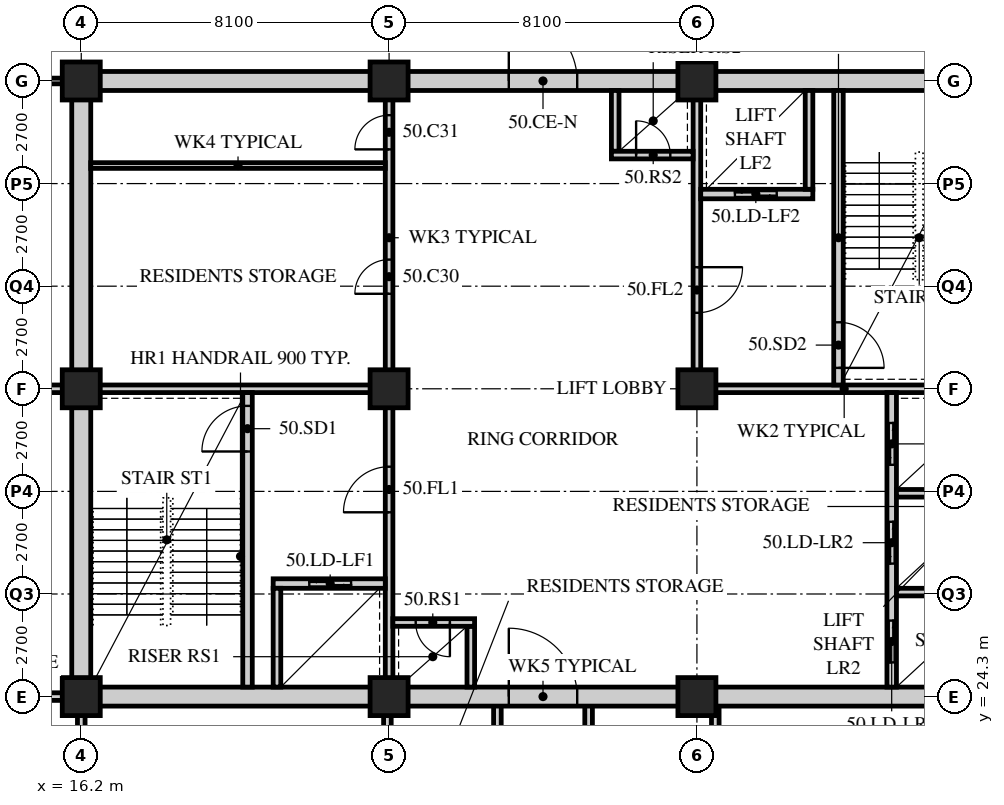
"""IFC4 building model, lengths in metres.
Left out: names, types, materials, properties, quantities, classifications, styles, units other than length and angle.
Written with IfcOpenShell. Run it as: python <this file> out.ifc"""

import sys

from ifc_helpers import new_model, si_unit, direction, frame, frame_2d, origin, origin_2d, place, context, subcontext, project, spatial, rectangle, hollow_rectangle, extrude, element, fill, save


model = new_model("IFC4")
c1 = context("Model", 3, precision=1e-05, world=origin(), true_north=direction((0.0, 1.0)))
c2 = subcontext(c1, "Body", "Model", "MODEL_VIEW")
j1 = project(units=[si_unit("LENGTHUNIT", "METRE"), si_unit("PLANEANGLEUNIT", "RADIAN")], contexts=[c1])
p1 = place(None, origin())
s1 = spatial("IfcSite", under=j1, at=p1, CompositionType="ELEMENT")
p2 = place(p1, origin())
s2 = spatial("IfcBuilding", under=s1, at=p2, CompositionType="ELEMENT")
p3 = place(p2, frame((0.0, 0.0, 195.6)))
s3 = spatial("IfcBuildingStorey", under=s2, at=p3, CompositionType="ELEMENT", Elevation=195.6)
for number, where, z_axis, x_axis in (
    (1, (16.2, 24.3, 0.0), (0.0, 0.0, 1.0), (1.0, 0.0, 0.0)),
    (2, (16.2, 32.4, 0.0), (0.0, 0.0, 1.0), (1.0, 0.0, 0.0)),
    (3, (16.2, 40.5, 0.0), (0.0, 0.0, 1.0), (1.0, 0.0, 0.0)),
    (4, (24.3, 24.3, 0.0), (0.0, 0.0, 1.0), (1.0, 0.0, 0.0)),
    (5, (24.3, 32.4, 0.0), (0.0, 0.0, 1.0), (1.0, 0.0, 0.0)),
    (6, (24.3, 40.5, 0.0), (0.0, 0.0, 1.0), (1.0, 0.0, 0.0)),
    (7, (32.4, 24.3, 0.0), (0.0, 0.0, 1.0), (1.0, 0.0, 0.0)),
    (8, (32.4, 32.4, 0.0), (0.0, 0.0, 1.0), (1.0, 0.0, 0.0)),
    (9, (32.4, 40.5, 0.0), (0.0, 0.0, 1.0), (1.0, 0.0, 0.0)),
):
    element("IfcColumn", number, at=place(p3, frame(where, z_axis=z_axis, x_axis=x_axis)), inside=s3, PredefinedType="COLUMN", context=c2, shape_type="SweptSolid", body=[
        extrude(hollow_rectangle(XDim=1.0, YDim=1.0, WallThickness=0.1, at=origin_2d()), origin(), (0.0, 0.0, 1.0), 3.6),
    ])
p4 = place(p3, frame((16.0, 40.5, 0.0), z_axis=(0.0, 0.0, 1.0), x_axis=(-1.0, 0.0, 0.0)))
e10 = element("IfcWall", 10, at=p4, inside=s3, PredefinedType="PARTITIONING", context=c2, shape_type="SweptSolid", body=[
    extrude(rectangle(XDim=6.1, YDim=0.15, at=frame_2d((3.05, 0.0))), origin(), (0.0, 0.0, 1.0), 3.39),
])
p5 = place(p3, frame((9.9, 32.4, 0.0), z_axis=(0.0, 0.0, 1.0), x_axis=(1.0, 0.0, 0.0)))
e11 = element("IfcWall", 11, at=p5, inside=s3, PredefinedType="SOLIDWALL", context=c2, shape_type="SweptSolid", body=[
    extrude(rectangle(XDim=6.3, YDim=0.2, at=frame_2d((3.15, 0.0))), origin(), (0.0, 0.0, 1.0), 3.39),
])
for number, where, z_axis, x_axis in (
    (12, (16.2, 20.7, 0.0), (0.0, 0.0, 1.0), (0.0, 1.0, 0.0)),
    (13, (24.256, 20.7, 0.0), (0.0, 0.0, 1.0), (0.0, 1.0, 0.0)),
):
    element("IfcWall", number, at=place(p3, frame(where, z_axis=z_axis, x_axis=x_axis)), inside=s3, PredefinedType="SOLIDWALL", context=c2, shape_type="SweptSolid", body=[
        extrude(rectangle(XDim=3.6, YDim=0.2, at=frame_2d((1.8, 0.0))), origin(), (0.0, 0.0, 1.0), 2.778),
    ])
for number, where, z_axis, x_axis in (
    (14, (32.883, 20.7, 0.0), (0.0, 0.0, 1.0), (0.0, 1.0, 0.0)),
    (15, (27.15, 20.7, 0.0), (0.0, 0.0, 1.0), (0.0, 1.0, 0.0)),
    (16, (29.55, 20.7, 0.0), (0.0, 0.0, 1.0), (0.0, 1.0, 0.0)),
):
    element("IfcWall", number, at=place(p3, frame(where, z_axis=z_axis, x_axis=x_axis)), inside=s3, PredefinedType="SOLIDWALL", context=c2, shape_type="SweptSolid", body=[
        extrude(rectangle(XDim=3.6, YDim=0.2, at=frame_2d((1.8, 0.0))), origin(), (0.0, 0.0, 1.0), 3.39),
    ])
p6 = place(p3, frame((9.9, 24.3, 0.0), z_axis=(0.0, 0.0, 1.0), x_axis=(1.0, 0.0, 0.0)))
e17 = element("IfcWall", 17, at=p6, inside=s3, PredefinedType="SOLIDWALL", context=c2, shape_type="SweptSolid", body=[
    extrude(rectangle(XDim=6.3, YDim=0.2, at=frame_2d((3.15, 0.0))), origin(), (0.0, 0.0, 1.0), 3.39),
])
p7 = place(p3, frame((15.95, 24.3, 0.0), z_axis=(0.0, 0.0, 1.0), x_axis=(1.0, 0.0, 0.0)))
e18 = element("IfcWall", 18, at=p7, inside=s3, PredefinedType="SOLIDWALL", context=c2, shape_type="SweptSolid", body=[
    extrude(rectangle(XDim=24.8, YDim=0.5, at=frame_2d((12.4, 0.0))), origin(), (0.0, 0.0, 1.0), 2.74),
])
p8 = place(p7, frame((11.5, 0.0, 0.0)))
e19 = element("IfcOpeningElement", 19, at=p8, cuts=e18, PredefinedType="OPENING", context=c2, shape_type="SweptSolid", body=[
    extrude(rectangle(XDim=1.8, YDim=2.4, at=frame_2d((0.9, 1.2))), frame((0.0, 0.26, 0.0), z_axis=(0.0, -1.0, 0.0), x_axis=(1.0, 0.0, 0.0)), (0.0, 0.0, 1.0), 0.52),
])
p9 = place(p3, frame((15.95, 40.5, 0.0), z_axis=(0.0, 0.0, 1.0), x_axis=(1.0, 0.0, 0.0)))
e20 = element("IfcWall", 20, at=p9, inside=s3, PredefinedType="SOLIDWALL", context=c2, shape_type="SweptSolid", body=[
    extrude(rectangle(XDim=24.8, YDim=0.5, at=frame_2d((12.4, 0.0))), origin(), (0.0, 0.0, 1.0), 2.74),
])
p10 = place(p9, frame((11.5, 0.0, 0.0)))
e21 = element("IfcOpeningElement", 21, at=p10, cuts=e20, PredefinedType="OPENING", context=c2, shape_type="SweptSolid", body=[
    extrude(rectangle(XDim=1.8, YDim=2.4, at=frame_2d((0.9, 1.2))), frame((0.0, 0.26, 0.0), z_axis=(0.0, -1.0, 0.0), x_axis=(1.0, 0.0, 0.0)), (0.0, 0.0, 1.0), 0.52),
])
p11 = place(p3, frame((16.2, 24.55, 0.0), z_axis=(0.0, 0.0, 1.0), x_axis=(0.0, 1.0, 0.0)))
e22 = element("IfcWall", 22, at=p11, inside=s3, PredefinedType="SOLIDWALL", context=c2, shape_type="SweptSolid", body=[
    extrude(rectangle(XDim=15.7, YDim=0.5, at=frame_2d((7.85, 0.0))), origin(), (0.0, 0.0, 1.0), 2.778),
])
p12 = place(p3, frame((16.45, 32.4, 0.0), z_axis=(0.0, 0.0, 1.0), x_axis=(1.0, 0.0, 0.0)))
e23 = element("IfcWall", 23, at=p12, inside=s3, PredefinedType="SOLIDWALL", context=c2, shape_type="SweptSolid", body=[
    extrude(rectangle(XDim=7.95, YDim=0.2, at=frame_2d((3.975, 0.0))), origin(), (0.0, 0.0, 1.0), 2.778),
])
p13 = place(p3, frame((24.3, 24.55, 0.0), z_axis=(0.0, 0.0, 1.0), x_axis=(0.0, 1.0, 0.0)))
e24 = element("IfcWall", 24, at=p13, inside=s3, PredefinedType="SOLIDWALL", context=c2, shape_type="SweptSolid", body=[
    extrude(rectangle(XDim=7.75, YDim=0.2, at=frame_2d((3.875, 0.0))), origin(), (0.0, 0.0, 1.0), 2.778),
])
p14 = place(p13, frame((4.6, 0.0, 0.0)))
e25 = element("IfcOpeningElement", 25, at=p14, cuts=e24, PredefinedType="OPENING", context=c2, shape_type="SweptSolid", body=[
    extrude(rectangle(XDim=1.2, YDim=2.1, at=frame_2d((0.6, 1.05))), frame((0.0, 0.11, 0.0), z_axis=(0.0, -1.0, 0.0), x_axis=(1.0, 0.0, 0.0)), (0.0, 0.0, 1.0), 0.22),
])
p15 = place(p3, frame((20.575, 24.55, 0.0), z_axis=(0.0, 0.0, 1.0), x_axis=(0.0, 1.0, 0.0)))
e26 = element("IfcWall", 26, at=p15, inside=s3, PredefinedType="SOLIDWALL", context=c2, shape_type="SweptSolid", body=[
    extrude(rectangle(XDim=7.75, YDim=0.25, at=frame_2d((3.875, 0.0))), origin(), (0.0, 0.0, 1.0), 3.39),
])
p16 = place(p15, frame((6.2, 0.0, 0.0)))
e27 = element("IfcOpeningElement", 27, at=p16, cuts=e26, PredefinedType="OPENING", context=c2, shape_type="SweptSolid", body=[
    extrude(rectangle(XDim=1.2, YDim=2.1, at=frame_2d((0.6, 1.05))), frame((0.0, 0.135, 0.0), z_axis=(0.0, -1.0, 0.0), x_axis=(1.0, 0.0, 0.0)), (0.0, 0.0, 1.0), 0.27),
])
p17 = place(p3, frame((21.25, 27.275, 0.0), z_axis=(0.0, 0.0, 1.0), x_axis=(1.0, 0.0, 0.0)))
e28 = element("IfcWall", 28, at=p17, inside=s3, PredefinedType="SOLIDWALL", context=c2, shape_type="SweptSolid", body=[
    extrude(rectangle(XDim=2.95, YDim=0.25, at=frame_2d((1.475, 0.0))), origin(), (0.0, 0.0, 1.0), 3.39),
])
p18 = place(p17, frame((0.95, 0.0, 0.0)))
e29 = element("IfcOpeningElement", 29, at=p18, cuts=e28, PredefinedType="OPENING", context=c2, shape_type="SweptSolid", body=[
    extrude(rectangle(XDim=1.1, YDim=2.4, at=frame_2d((0.55, 1.2))), frame((0.0, 0.135, 0.0), z_axis=(0.0, -1.0, 0.0), x_axis=(1.0, 0.0, 0.0)), (0.0, 0.0, 1.0), 0.27),
])
p19 = place(p3, frame((21.35, 24.55, 0.0), z_axis=(0.0, 0.0, 1.0), x_axis=(0.0, 1.0, 0.0)))
e30 = element("IfcWall", 30, at=p19, inside=s3, PredefinedType="SOLIDWALL", context=c2, shape_type="SweptSolid", body=[
    extrude(rectangle(XDim=2.6, YDim=0.2, at=frame_2d((1.3, 0.0))), origin(), (0.0, 0.0, 1.0), 3.39),
])
p20 = place(p3, frame((26.45, 24.55, 0.0), z_axis=(0.0, 0.0, 1.0), x_axis=(0.0, 1.0, 0.0)))
e31 = element("IfcWall", 31, at=p20, inside=s3, PredefinedType="SOLIDWALL", context=c2, shape_type="SweptSolid", body=[
    extrude(rectangle(XDim=1.6, YDim=0.2, at=frame_2d((0.8, 0.0))), origin(), (0.0, 0.0, 1.0), 3.39),
])
p21 = place(p3, frame((24.4, 26.25, 0.0), z_axis=(0.0, 0.0, 1.0), x_axis=(1.0, 0.0, 0.0)))
e32 = element("IfcWall", 32, at=p21, inside=s3, PredefinedType="SOLIDWALL", context=c2, shape_type="SweptSolid", body=[
    extrude(rectangle(XDim=2.15, YDim=0.2, at=frame_2d((1.075, 0.0))), origin(), (0.0, 0.0, 1.0), 3.39),
])
p22 = place(p21, frame((0.6, 0.0, 0.0)))
e33 = element("IfcOpeningElement", 33, at=p22, cuts=e32, PredefinedType="OPENING", context=c2, shape_type="SweptSolid", body=[
    extrude(rectangle(XDim=0.9, YDim=2.1, at=frame_2d((0.45, 1.05))), frame((0.0, 0.11, 0.0), z_axis=(0.0, -1.0, 0.0), x_axis=(1.0, 0.0, 0.0)), (0.0, 0.0, 1.0), 0.22),
])
p23 = place(p3, frame((32.3, 32.4, 0.0), z_axis=(0.0, 0.0, 1.0), x_axis=(1.0, 0.0, 0.0)))
e34 = element("IfcWall", 34, at=p23, inside=s3, PredefinedType="SOLIDWALL", context=c2, shape_type="SweptSolid", body=[
    extrude(rectangle(XDim=7.95, YDim=0.2, at=frame_2d((3.975, 0.0))), origin(), (0.0, 0.0, 1.0), 2.778),
])
p24 = place(p3, frame((32.4, 32.5, 0.0), z_axis=(0.0, 0.0, 1.0), x_axis=(0.0, 1.0, 0.0)))
e35 = element("IfcWall", 35, at=p24, inside=s3, PredefinedType="SOLIDWALL", context=c2, shape_type="SweptSolid", body=[
    extrude(rectangle(XDim=7.75, YDim=0.2, at=frame_2d((3.875, 0.0))), origin(), (0.0, 0.0, 1.0), 2.778),
])
p25 = place(p24, frame((1.9, 0.0, 0.0)))
e36 = element("IfcOpeningElement", 36, at=p25, cuts=e35, PredefinedType="OPENING", context=c2, shape_type="SweptSolid", body=[
    extrude(rectangle(XDim=1.2, YDim=2.1, at=frame_2d((0.6, 1.05))), frame((0.0, 0.11, 0.0), z_axis=(0.0, -1.0, 0.0), x_axis=(1.0, 0.0, 0.0)), (0.0, 0.0, 1.0), 0.22),
])
p26 = place(p3, frame((37.525, 24.55, 0.0), z_axis=(0.0, 0.0, 1.0), x_axis=(0.0, 1.0, 0.0)))
e37 = element("IfcWall", 37, at=p26, inside=s3, PredefinedType="SOLIDWALL", context=c2, shape_type="SweptSolid", body=[
    extrude(rectangle(XDim=7.75, YDim=0.25, at=frame_2d((3.875, 0.0))), origin(), (0.0, 0.0, 1.0), 3.39),
])
p27 = place(p26, frame((0.65, 0.0, 0.0)))
e38 = element("IfcOpeningElement", 38, at=p27, cuts=e37, PredefinedType="OPENING", context=c2, shape_type="SweptSolid", body=[
    extrude(rectangle(XDim=1.1, YDim=2.4, at=frame_2d((0.55, 1.2))), frame((0.0, 0.135, 0.0), z_axis=(0.0, -1.0, 0.0), x_axis=(1.0, 0.0, 0.0)), (0.0, 0.0, 1.0), 0.27),
])
p28 = place(p26, frame((3.25, 0.0, 0.0)))
e39 = element("IfcOpeningElement", 39, at=p28, cuts=e37, PredefinedType="OPENING", context=c2, shape_type="SweptSolid", body=[
    extrude(rectangle(XDim=1.1, YDim=2.4, at=frame_2d((0.55, 1.2))), frame((0.0, 0.135, 0.0), z_axis=(0.0, -1.0, 0.0), x_axis=(1.0, 0.0, 0.0)), (0.0, 0.0, 1.0), 0.27),
])
p29 = place(p26, frame((5.85, 0.0, 0.0)))
e40 = element("IfcOpeningElement", 40, at=p29, cuts=e37, PredefinedType="OPENING", context=c2, shape_type="SweptSolid", body=[
    extrude(rectangle(XDim=1.1, YDim=2.4, at=frame_2d((0.55, 1.2))), frame((0.0, 0.135, 0.0), z_axis=(0.0, -1.0, 0.0), x_axis=(1.0, 0.0, 0.0)), (0.0, 0.0, 1.0), 0.27),
])
for number, where, z_axis, x_axis in (
    (41, (37.65, 27.05, 0.0), (0.0, 0.0, 1.0), (1.0, 0.0, 0.0)),
    (42, (37.65, 29.65, 0.0), (0.0, 0.0, 1.0), (1.0, 0.0, 0.0)),
):
    element("IfcWall", number, at=place(p3, frame(where, z_axis=z_axis, x_axis=x_axis)), inside=s3, PredefinedType="SOLIDWALL", context=c2, shape_type="SweptSolid", body=[
        extrude(rectangle(XDim=2.6, YDim=0.2, at=frame_2d((1.3, 0.0))), origin(), (0.0, 0.0, 1.0), 3.39),
    ])
p30 = place(p3, frame((36.125, 32.5, 0.0), z_axis=(0.0, 0.0, 1.0), x_axis=(0.0, 1.0, 0.0)))
e43 = element("IfcWall", 43, at=p30, inside=s3, PredefinedType="SOLIDWALL", context=c2, shape_type="SweptSolid", body=[
    extrude(rectangle(XDim=7.75, YDim=0.25, at=frame_2d((3.875, 0.0))), origin(), (0.0, 0.0, 1.0), 3.39),
])
p31 = place(p30, frame((0.45, 0.0, 0.0)))
e44 = element("IfcOpeningElement", 44, at=p31, cuts=e43, PredefinedType="OPENING", context=c2, shape_type="SweptSolid", body=[
    extrude(rectangle(XDim=1.2, YDim=2.1, at=frame_2d((0.6, 1.05))), frame((0.0, 0.135, 0.0), z_axis=(0.0, -1.0, 0.0), x_axis=(1.0, 0.0, 0.0)), (0.0, 0.0, 1.0), 0.27),
])
p32 = place(p3, frame((32.5, 37.525, 0.0), z_axis=(0.0, 0.0, 1.0), x_axis=(1.0, 0.0, 0.0)))
e45 = element("IfcWall", 45, at=p32, inside=s3, PredefinedType="SOLIDWALL", context=c2, shape_type="SweptSolid", body=[
    extrude(rectangle(XDim=2.95, YDim=0.25, at=frame_2d((1.475, 0.0))), origin(), (0.0, 0.0, 1.0), 3.39),
])
p33 = place(p32, frame((0.9, 0.0, 0.0)))
e46 = element("IfcOpeningElement", 46, at=p33, cuts=e45, PredefinedType="OPENING", context=c2, shape_type="SweptSolid", body=[
    extrude(rectangle(XDim=1.1, YDim=2.4, at=frame_2d((0.55, 1.2))), frame((0.0, 0.135, 0.0), z_axis=(0.0, -1.0, 0.0), x_axis=(1.0, 0.0, 0.0)), (0.0, 0.0, 1.0), 0.27),
])
p34 = place(p3, frame((35.35, 37.65, 0.0), z_axis=(0.0, 0.0, 1.0), x_axis=(0.0, 1.0, 0.0)))
e47 = element("IfcWall", 47, at=p34, inside=s3, PredefinedType="SOLIDWALL", context=c2, shape_type="SweptSolid", body=[
    extrude(rectangle(XDim=2.6, YDim=0.2, at=frame_2d((1.3, 0.0))), origin(), (0.0, 0.0, 1.0), 3.39),
])
p35 = place(p3, frame((30.25, 38.65, 0.0), z_axis=(0.0, 0.0, 1.0), x_axis=(0.0, 1.0, 0.0)))
e48 = element("IfcWall", 48, at=p35, inside=s3, PredefinedType="SOLIDWALL", context=c2, shape_type="SweptSolid", body=[
    extrude(rectangle(XDim=1.6, YDim=0.2, at=frame_2d((0.8, 0.0))), origin(), (0.0, 0.0, 1.0), 3.39),
])
p36 = place(p3, frame((30.15, 38.55, 0.0), z_axis=(0.0, 0.0, 1.0), x_axis=(1.0, 0.0, 0.0)))
e49 = element("IfcWall", 49, at=p36, inside=s3, PredefinedType="SOLIDWALL", context=c2, shape_type="SweptSolid", body=[
    extrude(rectangle(XDim=2.15, YDim=0.2, at=frame_2d((1.075, 0.0))), origin(), (0.0, 0.0, 1.0), 3.39),
])
p37 = place(p36, frame((0.65, 0.0, 0.0)))
e50 = element("IfcOpeningElement", 50, at=p37, cuts=e49, PredefinedType="OPENING", context=c2, shape_type="SweptSolid", body=[
    extrude(rectangle(XDim=0.9, YDim=2.1, at=frame_2d((0.45, 1.05))), frame((0.0, 0.11, 0.0), z_axis=(0.0, -1.0, 0.0), x_axis=(1.0, 0.0, 0.0)), (0.0, 0.0, 1.0), 0.22),
])
p38 = place(p3, frame((24.3, 32.5, 0.0), z_axis=(0.0, 0.0, 1.0), x_axis=(0.0, 1.0, 0.0)))
e51 = element("IfcWall", 51, at=p38, inside=s3, PredefinedType="PARTITIONING", context=c2, shape_type="SweptSolid", body=[
    extrude(rectangle(XDim=7.75, YDim=0.2, at=frame_2d((3.875, 0.0))), origin(), (0.0, 0.0, 1.0), 2.778),
])
p39 = place(p38, frame((2.4, 0.0, 0.0)))
e52 = element("IfcOpeningElement", 52, at=p39, cuts=e51, PredefinedType="OPENING", context=c2, shape_type="SweptSolid", body=[
    extrude(rectangle(XDim=0.9, YDim=2.1, at=frame_2d((0.45, 1.05))), frame((0.0, 0.11, 0.0), z_axis=(0.0, -1.0, 0.0), x_axis=(1.0, 0.0, 0.0)), (0.0, 0.0, 1.0), 0.22),
])
p40 = place(p38, frame((6.2, 0.0, 0.0)))
e53 = element("IfcOpeningElement", 53, at=p40, cuts=e51, PredefinedType="OPENING", context=c2, shape_type="SweptSolid", body=[
    extrude(rectangle(XDim=0.9, YDim=2.1, at=frame_2d((0.45, 1.05))), frame((0.0, 0.11, 0.0), z_axis=(0.0, -1.0, 0.0), x_axis=(1.0, 0.0, 0.0)), (0.0, 0.0, 1.0), 0.22),
])
p41 = place(p3, frame((16.45, 38.275, 0.0), z_axis=(0.0, 0.0, 1.0), x_axis=(1.0, 0.0, 0.0)))
e54 = element("IfcWall", 54, at=p41, inside=s3, PredefinedType="PARTITIONING", context=c2, shape_type="SweptSolid", body=[
    extrude(rectangle(XDim=7.75, YDim=0.15, at=frame_2d((3.875, 0.0))), origin(), (0.0, 0.0, 1.0), 3.39),
])
p42 = place(p39, origin())
e55 = element("IfcDoor", 55, at=p42, inside=s3, OperationType="SINGLE_SWING_LEFT", PredefinedType="DOOR", context=c2, shape_type="SweptSolid", body=[
    extrude(rectangle(XDim=0.9, YDim=2.1, at=frame_2d((0.45, 1.05))), frame((0.0, 0.025, 0.0), z_axis=(0.0, -1.0, 0.0), x_axis=(1.0, 0.0, 0.0)), (0.0, 0.0, 1.0), 0.05),
])
fill(e52, e55)
p43 = place(p40, origin())
e56 = element("IfcDoor", 56, at=p43, inside=s3, OperationType="SINGLE_SWING_LEFT", PredefinedType="DOOR", context=c2, shape_type="SweptSolid", body=[
    extrude(rectangle(XDim=0.9, YDim=2.1, at=frame_2d((0.45, 1.05))), frame((0.0, 0.025, 0.0), z_axis=(0.0, -1.0, 0.0), x_axis=(1.0, 0.0, 0.0)), (0.0, 0.0, 1.0), 0.05),
])
fill(e53, e56)
p44 = place(p16, origin())
e57 = element("IfcDoor", 57, at=p44, inside=s3, OperationType="SINGLE_SWING_LEFT", PredefinedType="DOOR", context=c2, shape_type="SweptSolid", body=[
    extrude(rectangle(XDim=1.2, YDim=2.1, at=frame_2d((0.6, 1.05))), frame((0.0, 0.025, 0.0), z_axis=(0.0, -1.0, 0.0), x_axis=(1.0, 0.0, 0.0)), (0.0, 0.0, 1.0), 0.05),
])
fill(e27, e57)
p45 = place(p14, origin())
e58 = element("IfcDoor", 58, at=p45, inside=s3, OperationType="SINGLE_SWING_LEFT", PredefinedType="DOOR", context=c2, shape_type="SweptSolid", body=[
    extrude(rectangle(XDim=1.2, YDim=2.1, at=frame_2d((0.6, 1.05))), frame((0.0, 0.025, 0.0), z_axis=(0.0, -1.0, 0.0), x_axis=(1.0, 0.0, 0.0)), (0.0, 0.0, 1.0), 0.05),
])
fill(e25, e58)
p46 = place(p22, origin())
e59 = element("IfcDoor", 59, at=p46, inside=s3, OperationType="SINGLE_SWING_LEFT", PredefinedType="DOOR", context=c2, shape_type="SweptSolid", body=[
    extrude(rectangle(XDim=0.9, YDim=2.1, at=frame_2d((0.45, 1.05))), frame((0.0, 0.025, 0.0), z_axis=(0.0, -1.0, 0.0), x_axis=(1.0, 0.0, 0.0)), (0.0, 0.0, 1.0), 0.05),
])
fill(e33, e59)
p47 = place(p31, origin())
e60 = element("IfcDoor", 60, at=p47, inside=s3, OperationType="SINGLE_SWING_RIGHT", PredefinedType="DOOR", context=c2, shape_type="SweptSolid", body=[
    extrude(rectangle(XDim=1.2, YDim=2.1, at=frame_2d((0.6, 1.05))), frame((0.0, 0.025, 0.0), z_axis=(0.0, -1.0, 0.0), x_axis=(1.0, 0.0, 0.0)), (0.0, 0.0, 1.0), 0.05),
])
fill(e44, e60)
p48 = place(p25, origin())
e61 = element("IfcDoor", 61, at=p48, inside=s3, OperationType="SINGLE_SWING_LEFT", PredefinedType="DOOR", context=c2, shape_type="SweptSolid", body=[
    extrude(rectangle(XDim=1.2, YDim=2.1, at=frame_2d((0.6, 1.05))), frame((0.0, 0.025, 0.0), z_axis=(0.0, -1.0, 0.0), x_axis=(1.0, 0.0, 0.0)), (0.0, 0.0, 1.0), 0.05),
])
fill(e36, e61)
p49 = place(p37, origin())
e62 = element("IfcDoor", 62, at=p49, inside=s3, OperationType="SINGLE_SWING_LEFT", PredefinedType="DOOR", context=c2, shape_type="SweptSolid", body=[
    extrude(rectangle(XDim=0.9, YDim=2.1, at=frame_2d((0.45, 1.05))), frame((0.0, 0.025, 0.0), z_axis=(0.0, -1.0, 0.0), x_axis=(1.0, 0.0, 0.0)), (0.0, 0.0, 1.0), 0.05),
])
fill(e50, e62)
p50 = place(p27, origin())
e63 = element("IfcDoor", 63, at=p50, inside=s3, OperationType="DOUBLE_DOOR_SLIDING", PredefinedType="DOOR", context=c2, shape_type="SweptSolid", body=[
    extrude(rectangle(XDim=1.1, YDim=2.4, at=frame_2d((0.55, 1.2))), frame((0.0, 0.025, 0.0), z_axis=(0.0, -1.0, 0.0), x_axis=(1.0, 0.0, 0.0)), (0.0, 0.0, 1.0), 0.05),
])
fill(e38, e63)
p51 = place(p28, origin())
e64 = element("IfcDoor", 64, at=p51, inside=s3, OperationType="DOUBLE_DOOR_SLIDING", PredefinedType="DOOR", context=c2, shape_type="SweptSolid", body=[
    extrude(rectangle(XDim=1.1, YDim=2.4, at=frame_2d((0.55, 1.2))), frame((0.0, 0.025, 0.0), z_axis=(0.0, -1.0, 0.0), x_axis=(1.0, 0.0, 0.0)), (0.0, 0.0, 1.0), 0.05),
])
fill(e39, e64)
p52 = place(p29, origin())
e65 = element("IfcDoor", 65, at=p52, inside=s3, OperationType="DOUBLE_DOOR_SLIDING", PredefinedType="DOOR", context=c2, shape_type="SweptSolid", body=[
    extrude(rectangle(XDim=1.1, YDim=2.4, at=frame_2d((0.55, 1.2))), frame((0.0, 0.025, 0.0), z_axis=(0.0, -1.0, 0.0), x_axis=(1.0, 0.0, 0.0)), (0.0, 0.0, 1.0), 0.05),
])
fill(e40, e65)
p53 = place(p18, origin())
e66 = element("IfcDoor", 66, at=p53, inside=s3, OperationType="DOUBLE_DOOR_SLIDING", PredefinedType="DOOR", context=c2, shape_type="SweptSolid", body=[
    extrude(rectangle(XDim=1.1, YDim=2.4, at=frame_2d((0.55, 1.2))), frame((0.0, 0.025, 0.0), z_axis=(0.0, -1.0, 0.0), x_axis=(1.0, 0.0, 0.0)), (0.0, 0.0, 1.0), 0.05),
])
fill(e29, e66)
p54 = place(p33, origin())
e67 = element("IfcDoor", 67, at=p54, inside=s3, OperationType="DOUBLE_DOOR_SLIDING", PredefinedType="DOOR", context=c2, shape_type="SweptSolid", body=[
    extrude(rectangle(XDim=1.1, YDim=2.4, at=frame_2d((0.55, 1.2))), frame((0.0, 0.025, 0.0), z_axis=(0.0, -1.0, 0.0), x_axis=(1.0, 0.0, 0.0)), (0.0, 0.0, 1.0), 0.05),
])
fill(e46, e67)
p55 = place(p8, origin())
e68 = element("IfcDoor", 68, at=p55, inside=s3, OperationType="DOUBLE_DOOR_SINGLE_SWING", PredefinedType="DOOR", context=c2, shape_type="SweptSolid", body=[
    extrude(rectangle(XDim=1.8, YDim=2.4, at=frame_2d((0.9, 1.2))), frame((0.0, 0.025, 0.0), z_axis=(0.0, -1.0, 0.0), x_axis=(1.0, 0.0, 0.0)), (0.0, 0.0, 1.0), 0.05),
])
fill(e19, e68)
p56 = place(p10, origin())
e69 = element("IfcDoor", 69, at=p56, inside=s3, OperationType="DOUBLE_DOOR_SINGLE_SWING", PredefinedType="DOOR", context=c2, shape_type="SweptSolid", body=[
    extrude(rectangle(XDim=1.8, YDim=2.4, at=frame_2d((0.9, 1.2))), frame((0.0, 0.025, 0.0), z_axis=(0.0, -1.0, 0.0), x_axis=(1.0, 0.0, 0.0)), (0.0, 0.0, 1.0), 0.05),
])
fill(e21, e69)
save(model, sys.argv[1])
